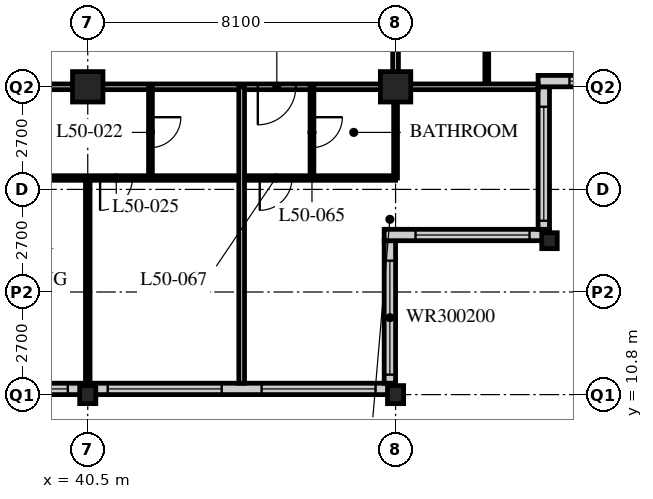
"""IFC4 building model, lengths in metres.
Left out: names, types, materials, properties, quantities, classifications, styles, units other than length and angle.
Written with IfcOpenShell. Run it as: python <this file> out.ifc"""

import sys

from ifc_helpers import new_model, si_unit, direction, frame, frame_2d, origin, origin_2d, place, context, subcontext, project, spatial, rectangle, hollow_rectangle, i_section, extrude, element, fill, save


model = new_model("IFC4")
c1 = context("Model", 3, precision=1e-05, world=origin(), true_north=direction((0.0, 1.0)))
c2 = subcontext(c1, "Body", "Model", "MODEL_VIEW")
j1 = project(units=[si_unit("LENGTHUNIT", "METRE"), si_unit("PLANEANGLEUNIT", "RADIAN")], contexts=[c1])
p1 = place(None, origin())
s1 = spatial("IfcSite", under=j1, at=p1, CompositionType="ELEMENT")
p2 = place(p1, origin())
s2 = spatial("IfcBuilding", under=s1, at=p2, CompositionType="ELEMENT")
p3 = place(p2, frame((0.0, 0.0, 195.6)))
s3 = spatial("IfcBuildingStorey", under=s2, at=p3, CompositionType="ELEMENT", Elevation=195.6)
p4 = place(p3, frame((40.5, 10.8, 0.0), z_axis=(0.0, 0.0, 1.0), x_axis=(1.0, 0.0, 0.0)))
e1 = element("IfcColumn", 1, at=p4, inside=s3, PredefinedType="COLUMN", context=c2, shape_type="SweptSolid", body=[
    extrude(i_section(OverallWidth=0.424, OverallDepth=0.475, WebThickness=0.048, FlangeThickness=0.077, FilletRadius=0.015, at=origin_2d()), origin(), (0.0, 0.0, 1.0), 3.6),
])
p5 = place(p3, frame((40.5, 18.9, 0.0), z_axis=(0.0, 0.0, 1.0), x_axis=(1.0, 0.0, 0.0)))
e2 = element("IfcColumn", 2, at=p5, inside=s3, PredefinedType="COLUMN", context=c2, shape_type="SweptSolid", body=[
    extrude(hollow_rectangle(XDim=0.8, YDim=0.8, WallThickness=0.08, at=origin_2d()), origin(), (0.0, 0.0, 1.0), 3.6),
])
p6 = place(p3, frame((48.6, 10.8, 0.0), z_axis=(0.0, 0.0, 1.0), x_axis=(1.0, 0.0, 0.0)))
e3 = element("IfcColumn", 3, at=p6, inside=s3, PredefinedType="COLUMN", context=c2, shape_type="SweptSolid", body=[
    extrude(i_section(OverallWidth=0.424, OverallDepth=0.475, WebThickness=0.048, FlangeThickness=0.077, FilletRadius=0.015, at=origin_2d()), origin(), (0.0, 0.0, 1.0), 3.6),
])
p7 = place(p3, frame((48.6, 18.9, 0.0), z_axis=(0.0, 0.0, 1.0), x_axis=(1.0, 0.0, 0.0)))
e4 = element("IfcColumn", 4, at=p7, inside=s3, PredefinedType="COLUMN", context=c2, shape_type="SweptSolid", body=[
    extrude(hollow_rectangle(XDim=0.8, YDim=0.8, WallThickness=0.08, at=origin_2d()), origin(), (0.0, 0.0, 1.0), 3.6),
])
p8 = place(p3, frame((52.65, 14.85, 0.0), z_axis=(0.0, 0.0, 1.0), x_axis=(1.0, 0.0, 0.0)))
e5 = element("IfcColumn", 5, at=p8, inside=s3, PredefinedType="COLUMN", context=c2, shape_type="SweptSolid", body=[
    extrude(i_section(OverallWidth=0.407, OverallDepth=0.419, WebThickness=0.031, FlangeThickness=0.049, FilletRadius=0.015, at=origin_2d()), origin(), (0.0, 0.0, 1.0), 3.6),
])
p9 = place(p3, frame((8.4, 10.95, 0.0), z_axis=(0.0, 0.0, 1.0), x_axis=(1.0, 0.0, 0.0)))
e6 = element("IfcWall", 6, at=p9, inside=s3, PredefinedType="SOLIDWALL", context=c2, shape_type="SweptSolid", body=[
    extrude(rectangle(XDim=40.2, YDim=0.3, at=frame_2d((20.1, 0.0))), origin(), (0.0, 0.0, 1.0), 3.39),
])
p10 = place(p9, frame((0.225, 0.0, 0.6)))
e7 = element("IfcOpeningElement", 7, at=p10, cuts=e6, PredefinedType="OPENING", context=c2, shape_type="SweptSolid", body=[
    extrude(rectangle(XDim=3.0, YDim=2.4, at=frame_2d((1.5, 1.2))), frame((0.0, 0.16, 0.0), z_axis=(0.0, -1.0, 0.0), x_axis=(1.0, 0.0, 0.0)), (0.0, 0.0, 1.0), 0.32),
])
p11 = place(p9, frame((4.275, 0.0, 0.6)))
e8 = element("IfcOpeningElement", 8, at=p11, cuts=e6, PredefinedType="OPENING", context=c2, shape_type="SweptSolid", body=[
    extrude(rectangle(XDim=3.0, YDim=2.4, at=frame_2d((1.5, 1.2))), frame((0.0, 0.16, 0.0), z_axis=(0.0, -1.0, 0.0), x_axis=(1.0, 0.0, 0.0)), (0.0, 0.0, 1.0), 0.32),
])
p12 = place(p9, frame((8.325, 0.0, 0.6)))
e9 = element("IfcOpeningElement", 9, at=p12, cuts=e6, PredefinedType="OPENING", context=c2, shape_type="SweptSolid", body=[
    extrude(rectangle(XDim=3.0, YDim=2.4, at=frame_2d((1.5, 1.2))), frame((0.0, 0.16, 0.0), z_axis=(0.0, -1.0, 0.0), x_axis=(1.0, 0.0, 0.0)), (0.0, 0.0, 1.0), 0.32),
])
p13 = place(p9, frame((12.375, 0.0, 0.6)))
e10 = element("IfcOpeningElement", 10, at=p13, cuts=e6, PredefinedType="OPENING", context=c2, shape_type="SweptSolid", body=[
    extrude(rectangle(XDim=3.0, YDim=2.4, at=frame_2d((1.5, 1.2))), frame((0.0, 0.16, 0.0), z_axis=(0.0, -1.0, 0.0), x_axis=(1.0, 0.0, 0.0)), (0.0, 0.0, 1.0), 0.32),
])
p14 = place(p9, frame((16.425, 0.0, 0.6)))
e11 = element("IfcOpeningElement", 11, at=p14, cuts=e6, PredefinedType="OPENING", context=c2, shape_type="SweptSolid", body=[
    extrude(rectangle(XDim=3.0, YDim=2.4, at=frame_2d((1.5, 1.2))), frame((0.0, 0.16, 0.0), z_axis=(0.0, -1.0, 0.0), x_axis=(1.0, 0.0, 0.0)), (0.0, 0.0, 1.0), 0.32),
])
p15 = place(p9, frame((20.475, 0.0, 0.6)))
e12 = element("IfcOpeningElement", 12, at=p15, cuts=e6, PredefinedType="OPENING", context=c2, shape_type="SweptSolid", body=[
    extrude(rectangle(XDim=3.0, YDim=2.4, at=frame_2d((1.5, 1.2))), frame((0.0, 0.16, 0.0), z_axis=(0.0, -1.0, 0.0), x_axis=(1.0, 0.0, 0.0)), (0.0, 0.0, 1.0), 0.32),
])
p16 = place(p9, frame((24.525, 0.0, 0.6)))
e13 = element("IfcOpeningElement", 13, at=p16, cuts=e6, PredefinedType="OPENING", context=c2, shape_type="SweptSolid", body=[
    extrude(rectangle(XDim=3.0, YDim=2.4, at=frame_2d((1.5, 1.2))), frame((0.0, 0.16, 0.0), z_axis=(0.0, -1.0, 0.0), x_axis=(1.0, 0.0, 0.0)), (0.0, 0.0, 1.0), 0.32),
])
p17 = place(p9, frame((28.575, 0.0, 0.6)))
e14 = element("IfcOpeningElement", 14, at=p17, cuts=e6, PredefinedType="OPENING", context=c2, shape_type="SweptSolid", body=[
    extrude(rectangle(XDim=3.0, YDim=2.4, at=frame_2d((1.5, 1.2))), frame((0.0, 0.16, 0.0), z_axis=(0.0, -1.0, 0.0), x_axis=(1.0, 0.0, 0.0)), (0.0, 0.0, 1.0), 0.32),
])
p18 = place(p9, frame((32.625, 0.0, 0.6)))
e15 = element("IfcOpeningElement", 15, at=p18, cuts=e6, PredefinedType="OPENING", context=c2, shape_type="SweptSolid", body=[
    extrude(rectangle(XDim=3.0, YDim=2.4, at=frame_2d((1.5, 1.2))), frame((0.0, 0.16, 0.0), z_axis=(0.0, -1.0, 0.0), x_axis=(1.0, 0.0, 0.0)), (0.0, 0.0, 1.0), 0.32),
])
p19 = place(p9, frame((36.675, 0.0, 0.6)))
e16 = element("IfcOpeningElement", 16, at=p19, cuts=e6, PredefinedType="OPENING", context=c2, shape_type="SweptSolid", body=[
    extrude(rectangle(XDim=3.0, YDim=2.4, at=frame_2d((1.5, 1.2))), frame((0.0, 0.16, 0.0), z_axis=(0.0, -1.0, 0.0), x_axis=(1.0, 0.0, 0.0)), (0.0, 0.0, 1.0), 0.32),
])
p20 = place(p3, frame((48.45, 11.1, 0.0), z_axis=(0.0, 0.0, 1.0), x_axis=(0.0, 1.0, 0.0)))
e17 = element("IfcWall", 17, at=p20, inside=s3, PredefinedType="SOLIDWALL", context=c2, shape_type="SweptSolid", body=[
    extrude(rectangle(XDim=3.75, YDim=0.3, at=frame_2d((1.875, 0.0))), origin(), (0.0, 0.0, 1.0), 3.39),
])
p21 = place(p20, frame((0.225, 0.0, 0.6)))
e18 = element("IfcOpeningElement", 18, at=p21, cuts=e17, PredefinedType="OPENING", context=c2, shape_type="SweptSolid", body=[
    extrude(rectangle(XDim=3.0, YDim=2.0, at=frame_2d((1.5, 1.0))), frame((0.0, 0.16, 0.0), z_axis=(0.0, -1.0, 0.0), x_axis=(1.0, 0.0, 0.0)), (0.0, 0.0, 1.0), 0.32),
])
p22 = place(p3, frame((48.3, 15.0, 0.0), z_axis=(0.0, 0.0, 1.0), x_axis=(1.0, 0.0, 0.0)))
e19 = element("IfcWall", 19, at=p22, inside=s3, PredefinedType="SOLIDWALL", context=c2, shape_type="SweptSolid", body=[
    extrude(rectangle(XDim=4.35, YDim=0.3, at=frame_2d((2.175, 0.0))), origin(), (0.0, 0.0, 1.0), 3.39),
])
p23 = place(p22, frame((0.825, 0.0, 0.6)))
e20 = element("IfcOpeningElement", 20, at=p23, cuts=e19, PredefinedType="OPENING", context=c2, shape_type="SweptSolid", body=[
    extrude(rectangle(XDim=3.0, YDim=2.0, at=frame_2d((1.5, 1.0))), frame((0.0, 0.16, 0.0), z_axis=(0.0, -1.0, 0.0), x_axis=(1.0, 0.0, 0.0)), (0.0, 0.0, 1.0), 0.32),
])
p24 = place(p3, frame((52.5, 15.15, 0.0), z_axis=(0.0, 0.0, 1.0), x_axis=(0.0, 1.0, 0.0)))
e21 = element("IfcWall", 21, at=p24, inside=s3, PredefinedType="SOLIDWALL", context=c2, shape_type="SweptSolid", body=[
    extrude(rectangle(XDim=3.75, YDim=0.3, at=frame_2d((1.875, 0.0))), origin(), (0.0, 0.0, 1.0), 3.39),
])
p25 = place(p24, frame((0.225, 0.0, 0.6)))
e22 = element("IfcOpeningElement", 22, at=p25, cuts=e21, PredefinedType="OPENING", context=c2, shape_type="SweptSolid", body=[
    extrude(rectangle(XDim=3.0, YDim=2.0, at=frame_2d((1.5, 1.0))), frame((0.0, 0.16, 0.0), z_axis=(0.0, -1.0, 0.0), x_axis=(1.0, 0.0, 0.0)), (0.0, 0.0, 1.0), 0.32),
])
p26 = place(p3, frame((52.35, 19.05, 0.0), z_axis=(0.0, 0.0, 1.0), x_axis=(1.0, 0.0, 0.0)))
e23 = element("IfcWall", 23, at=p26, inside=s3, PredefinedType="SOLIDWALL", context=c2, shape_type="SweptSolid", body=[
    extrude(rectangle(XDim=4.35, YDim=0.3, at=frame_2d((2.175, 0.0))), origin(), (0.0, 0.0, 1.0), 3.39),
])
p27 = place(p26, frame((0.825, 0.0, 0.6)))
e24 = element("IfcOpeningElement", 24, at=p27, cuts=e23, PredefinedType="OPENING", context=c2, shape_type="SweptSolid", body=[
    extrude(rectangle(XDim=3.0, YDim=2.0, at=frame_2d((1.5, 1.0))), frame((0.0, 0.16, 0.0), z_axis=(0.0, -1.0, 0.0), x_axis=(1.0, 0.0, 0.0)), (0.0, 0.0, 1.0), 0.32),
])
p28 = place(p3, frame((8.1, 18.9, 0.0), z_axis=(0.0, 0.0, 1.0), x_axis=(1.0, 0.0, 0.0)))
e25 = element("IfcWall", 25, at=p28, inside=s3, PredefinedType="PARTITIONING", context=c2, shape_type="SweptSolid", body=[
    extrude(rectangle(XDim=40.5, YDim=0.15, at=frame_2d((20.25, 0.0))), origin(), (0.0, 0.0, 1.0), 2.778),
])
p29 = place(p28, frame((4.45, 0.0, 0.0)))
e26 = element("IfcOpeningElement", 26, at=p29, cuts=e25, PredefinedType="OPENING", context=c2, shape_type="SweptSolid", body=[
    extrude(rectangle(XDim=1.0, YDim=2.1, at=frame_2d((0.5, 1.05))), frame((0.0, 0.085, 0.0), z_axis=(0.0, -1.0, 0.0), x_axis=(1.0, 0.0, 0.0)), (0.0, 0.0, 1.0), 0.17),
])
p30 = place(p28, frame((17.1, 0.0, 0.0)))
e27 = element("IfcOpeningElement", 27, at=p30, cuts=e25, PredefinedType="OPENING", context=c2, shape_type="SweptSolid", body=[
    extrude(rectangle(XDim=1.0, YDim=2.1, at=frame_2d((0.5, 1.05))), frame((0.0, 0.085, 0.0), z_axis=(0.0, -1.0, 0.0), x_axis=(1.0, 0.0, 0.0)), (0.0, 0.0, 1.0), 0.17),
])
p31 = place(p28, frame((28.75, 0.0, 0.0)))
e28 = element("IfcOpeningElement", 28, at=p31, cuts=e25, PredefinedType="OPENING", context=c2, shape_type="SweptSolid", body=[
    extrude(rectangle(XDim=1.0, YDim=2.1, at=frame_2d((0.5, 1.05))), frame((0.0, 0.085, 0.0), z_axis=(0.0, -1.0, 0.0), x_axis=(1.0, 0.0, 0.0)), (0.0, 0.0, 1.0), 0.17),
])
p32 = place(p28, frame((2.625, 0.0, 0.0)))
e29 = element("IfcOpeningElement", 29, at=p32, cuts=e25, PredefinedType="OPENING", context=c2, shape_type="SweptSolid", body=[
    extrude(rectangle(XDim=1.0, YDim=2.1, at=frame_2d((0.5, 1.05))), frame((0.0, 0.085, 0.0), z_axis=(0.0, -1.0, 0.0), x_axis=(1.0, 0.0, 0.0)), (0.0, 0.0, 1.0), 0.17),
])
p33 = place(p28, frame((36.875, 0.0, 0.0)))
e30 = element("IfcOpeningElement", 30, at=p33, cuts=e25, PredefinedType="OPENING", context=c2, shape_type="SweptSolid", body=[
    extrude(rectangle(XDim=1.0, YDim=2.1, at=frame_2d((0.5, 1.05))), frame((0.0, 0.085, 0.0), z_axis=(0.0, -1.0, 0.0), x_axis=(1.0, 0.0, 0.0)), (0.0, 0.0, 1.0), 0.17),
])
p34 = place(p3, frame((48.6, 18.9, 0.0), z_axis=(0.0, 0.0, 1.0), x_axis=(0.0, 1.0, 0.0)))
e31 = element("IfcWall", 31, at=p34, inside=s3, PredefinedType="PARTITIONING", context=c2, shape_type="SweptSolid", body=[
    extrude(rectangle(XDim=24.3, YDim=0.15, at=frame_2d((12.15, 0.0))), origin(), (0.0, 0.0, 1.0), 2.778),
])
p35 = place(p34, frame((2.35, 0.0, 0.0)))
e32 = element("IfcOpeningElement", 32, at=p35, cuts=e31, PredefinedType="OPENING", context=c2, shape_type="SweptSolid", body=[
    extrude(rectangle(XDim=1.0, YDim=2.1, at=frame_2d((0.5, 1.05))), frame((0.0, 0.085, 0.0), z_axis=(0.0, -1.0, 0.0), x_axis=(1.0, 0.0, 0.0)), (0.0, 0.0, 1.0), 0.17),
])
p36 = place(p34, frame((4.75, 0.0, 0.0)))
e33 = element("IfcOpeningElement", 33, at=p36, cuts=e31, PredefinedType="OPENING", context=c2, shape_type="SweptSolid", body=[
    extrude(rectangle(XDim=1.0, YDim=2.1, at=frame_2d((0.5, 1.05))), frame((0.0, 0.085, 0.0), z_axis=(0.0, -1.0, 0.0), x_axis=(1.0, 0.0, 0.0)), (0.0, 0.0, 1.0), 0.17),
])
p37 = place(p34, frame((9.0, 0.0, 0.0)))
e34 = element("IfcOpeningElement", 34, at=p37, cuts=e31, PredefinedType="OPENING", context=c2, shape_type="SweptSolid", body=[
    extrude(rectangle(XDim=1.0, YDim=2.1, at=frame_2d((0.5, 1.05))), frame((0.0, 0.085, 0.0), z_axis=(0.0, -1.0, 0.0), x_axis=(1.0, 0.0, 0.0)), (0.0, 0.0, 1.0), 0.17),
])
p38 = place(p3, frame((42.15, 18.9, 0.0), z_axis=(0.0, 0.0, 1.0), x_axis=(0.0, -1.0, 0.0)))
e35 = element("IfcWall", 35, at=p38, inside=s3, PredefinedType="PARTITIONING", context=c2, shape_type="SweptSolid", body=[
    extrude(rectangle(XDim=2.4, YDim=0.1, at=frame_2d((1.2, 0.0))), origin(), (0.0, 0.0, 1.0), 3.39),
])
p39 = place(p38, frame((0.8, 0.0, 0.0)))
e36 = element("IfcOpeningElement", 36, at=p39, cuts=e35, PredefinedType="OPENING", context=c2, shape_type="SweptSolid", body=[
    extrude(rectangle(XDim=0.8, YDim=2.1, at=frame_2d((0.4, 1.05))), frame((0.0, 0.06, 0.0), z_axis=(0.0, -1.0, 0.0), x_axis=(1.0, 0.0, 0.0)), (0.0, 0.0, 1.0), 0.12),
])
p40 = place(p3, frame((40.5, 16.5, 0.0), z_axis=(0.0, 0.0, 1.0), x_axis=(0.0, -1.0, 0.0)))
e37 = element("IfcWall", 37, at=p40, inside=s3, PredefinedType="PARTITIONING", context=c2, shape_type="SweptSolid", body=[
    extrude(rectangle(XDim=5.4, YDim=0.12, at=frame_2d((2.7, 0.0))), origin(), (0.0, 0.0, 1.0), 2.778),
])
p41 = place(p3, frame((51.0, 18.9, 0.0), z_axis=(0.0, 0.0, 1.0), x_axis=(0.0, 1.0, 0.0)))
e38 = element("IfcWall", 38, at=p41, inside=s3, PredefinedType="PARTITIONING", context=c2, shape_type="SweptSolid", body=[
    extrude(rectangle(XDim=2.2, YDim=0.1, at=frame_2d((1.1, 0.0))), origin(), (0.0, 0.0, 1.0), 3.39),
])
p42 = place(p3, frame((8.1, 16.5, 0.0), z_axis=(0.0, 0.0, 1.0), x_axis=(1.0, 0.0, 0.0)))
e39 = element("IfcWall", 39, at=p42, inside=s3, PredefinedType="PARTITIONING", context=c2, shape_type="SweptSolid", body=[
    extrude(rectangle(XDim=40.5, YDim=0.12, at=frame_2d((20.25, 0.0))), origin(), (0.0, 0.0, 1.0), 3.39),
])
p43 = place(p42, frame((5.025, 0.0, 0.0)))
e40 = element("IfcOpeningElement", 40, at=p43, cuts=e39, PredefinedType="OPENING", context=c2, shape_type="SweptSolid", body=[
    extrude(rectangle(XDim=0.85, YDim=2.1, at=frame_2d((0.425, 1.05))), frame((0.0, 0.07, 0.0), z_axis=(0.0, -1.0, 0.0), x_axis=(1.0, 0.0, 0.0)), (0.0, 0.0, 1.0), 0.14),
])
p44 = place(p42, frame((12.475, 0.0, 0.0)))
e41 = element("IfcOpeningElement", 41, at=p44, cuts=e39, PredefinedType="OPENING", context=c2, shape_type="SweptSolid", body=[
    extrude(rectangle(XDim=0.85, YDim=2.1, at=frame_2d((0.425, 1.05))), frame((0.0, 0.07, 0.0), z_axis=(0.0, -1.0, 0.0), x_axis=(1.0, 0.0, 0.0)), (0.0, 0.0, 1.0), 0.14),
])
p45 = place(p42, frame((17.175, 0.0, 0.0)))
e42 = element("IfcOpeningElement", 42, at=p45, cuts=e39, PredefinedType="OPENING", context=c2, shape_type="SweptSolid", body=[
    extrude(rectangle(XDim=0.85, YDim=2.1, at=frame_2d((0.425, 1.05))), frame((0.0, 0.07, 0.0), z_axis=(0.0, -1.0, 0.0), x_axis=(1.0, 0.0, 0.0)), (0.0, 0.0, 1.0), 0.14),
])
p46 = place(p42, frame((24.625, 0.0, 0.0)))
e43 = element("IfcOpeningElement", 43, at=p46, cuts=e39, PredefinedType="OPENING", context=c2, shape_type="SweptSolid", body=[
    extrude(rectangle(XDim=0.85, YDim=2.1, at=frame_2d((0.425, 1.05))), frame((0.0, 0.07, 0.0), z_axis=(0.0, -1.0, 0.0), x_axis=(1.0, 0.0, 0.0)), (0.0, 0.0, 1.0), 0.14),
])
p47 = place(p42, frame((29.325, 0.0, 0.0)))
e44 = element("IfcOpeningElement", 44, at=p47, cuts=e39, PredefinedType="OPENING", context=c2, shape_type="SweptSolid", body=[
    extrude(rectangle(XDim=0.85, YDim=2.1, at=frame_2d((0.425, 1.05))), frame((0.0, 0.07, 0.0), z_axis=(0.0, -1.0, 0.0), x_axis=(1.0, 0.0, 0.0)), (0.0, 0.0, 1.0), 0.14),
])
p48 = place(p42, frame((32.725, 0.0, 0.0)))
e45 = element("IfcOpeningElement", 45, at=p48, cuts=e39, PredefinedType="OPENING", context=c2, shape_type="SweptSolid", body=[
    extrude(rectangle(XDim=0.85, YDim=2.1, at=frame_2d((0.425, 1.05))), frame((0.0, 0.07, 0.0), z_axis=(0.0, -1.0, 0.0), x_axis=(1.0, 0.0, 0.0)), (0.0, 0.0, 1.0), 0.14),
])
p49 = place(p42, frame((2.725, 0.0, 0.0)))
e46 = element("IfcOpeningElement", 46, at=p49, cuts=e39, PredefinedType="OPENING", context=c2, shape_type="SweptSolid", body=[
    extrude(rectangle(XDim=0.85, YDim=2.1, at=frame_2d((0.425, 1.05))), frame((0.0, 0.07, 0.0), z_axis=(0.0, -1.0, 0.0), x_axis=(1.0, 0.0, 0.0)), (0.0, 0.0, 1.0), 0.14),
])
p50 = place(p42, frame((36.925, 0.0, 0.0)))
e47 = element("IfcOpeningElement", 47, at=p50, cuts=e39, PredefinedType="OPENING", context=c2, shape_type="SweptSolid", body=[
    extrude(rectangle(XDim=0.85, YDim=2.1, at=frame_2d((0.425, 1.05))), frame((0.0, 0.07, 0.0), z_axis=(0.0, -1.0, 0.0), x_axis=(1.0, 0.0, 0.0)), (0.0, 0.0, 1.0), 0.14),
])
p51 = place(p3, frame((46.4, 18.9, 0.0), z_axis=(0.0, 0.0, 1.0), x_axis=(0.0, -1.0, 0.0)))
e48 = element("IfcWall", 48, at=p51, inside=s3, PredefinedType="PARTITIONING", context=c2, shape_type="SweptSolid", body=[
    extrude(rectangle(XDim=2.4, YDim=0.1, at=frame_2d((1.2, 0.0))), origin(), (0.0, 0.0, 1.0), 3.39),
])
p52 = place(p51, frame((0.8, 0.0, 0.0)))
e49 = element("IfcOpeningElement", 49, at=p52, cuts=e48, PredefinedType="OPENING", context=c2, shape_type="SweptSolid", body=[
    extrude(rectangle(XDim=0.8, YDim=2.1, at=frame_2d((0.4, 1.05))), frame((0.0, 0.06, 0.0), z_axis=(0.0, -1.0, 0.0), x_axis=(1.0, 0.0, 0.0)), (0.0, 0.0, 1.0), 0.12),
])
p53 = place(p3, frame((48.6, 18.9, 0.0), z_axis=(0.0, 0.0, 1.0), x_axis=(0.0, -1.0, 0.0)))
e50 = element("IfcWall", 50, at=p53, inside=s3, PredefinedType="PARTITIONING", context=c2, shape_type="SweptSolid", body=[
    extrude(rectangle(XDim=2.4, YDim=0.1, at=frame_2d((1.2, 0.0))), origin(), (0.0, 0.0, 1.0), 2.778),
])
p54 = place(p3, frame((48.6, 18.9, 0.0), z_axis=(0.0, 0.0, 1.0), x_axis=(1.0, 0.0, 0.0)))
e51 = element("IfcWall", 51, at=p54, inside=s3, PredefinedType="PARTITIONING", context=c2, shape_type="SweptSolid", body=[
    extrude(rectangle(XDim=3.75, YDim=0.15, at=frame_2d((1.875, 0.0))), origin(), (0.0, 0.0, 1.0), 2.778),
])
p55 = place(p3, frame((44.55, 18.9, 0.0), z_axis=(0.0, 0.0, 1.0), x_axis=(0.0, -1.0, 0.0)))
e52 = element("IfcWall", 52, at=p55, inside=s3, PredefinedType="PARTITIONING", context=c2, shape_type="SweptSolid", body=[
    extrude(rectangle(XDim=7.8, YDim=0.15, at=frame_2d((3.9, 0.0))), origin(), (0.0, 0.0, 1.0), 3.39),
])
p56 = place(p17, origin())
e53 = element("IfcWindow", 53, at=p56, inside=s3, PartitioningType="SINGLE_PANEL", PredefinedType="WINDOW", context=c2, shape_type="SweptSolid", body=[
    extrude(rectangle(XDim=3.0, YDim=2.4, at=frame_2d((1.5, 1.2))), frame((0.0, 0.03, 0.0), z_axis=(0.0, -1.0, 0.0), x_axis=(1.0, 0.0, 0.0)), (0.0, 0.0, 1.0), 0.06),
])
fill(e14, e53)
p57 = place(p18, origin())
e54 = element("IfcWindow", 54, at=p57, inside=s3, PartitioningType="SINGLE_PANEL", PredefinedType="WINDOW", context=c2, shape_type="SweptSolid", body=[
    extrude(rectangle(XDim=3.0, YDim=2.4, at=frame_2d((1.5, 1.2))), frame((0.0, 0.03, 0.0), z_axis=(0.0, -1.0, 0.0), x_axis=(1.0, 0.0, 0.0)), (0.0, 0.0, 1.0), 0.06),
])
fill(e15, e54)
p58 = place(p19, origin())
e55 = element("IfcWindow", 55, at=p58, inside=s3, PartitioningType="SINGLE_PANEL", PredefinedType="WINDOW", context=c2, shape_type="SweptSolid", body=[
    extrude(rectangle(XDim=3.0, YDim=2.4, at=frame_2d((1.5, 1.2))), frame((0.0, 0.03, 0.0), z_axis=(0.0, -1.0, 0.0), x_axis=(1.0, 0.0, 0.0)), (0.0, 0.0, 1.0), 0.06),
])
fill(e16, e55)
p59 = place(p21, origin())
e56 = element("IfcWindow", 56, at=p59, inside=s3, PartitioningType="SINGLE_PANEL", PredefinedType="WINDOW", context=c2, shape_type="SweptSolid", body=[
    extrude(rectangle(XDim=3.0, YDim=2.0, at=frame_2d((1.5, 1.0))), frame((0.0, 0.03, 0.0), z_axis=(0.0, -1.0, 0.0), x_axis=(1.0, 0.0, 0.0)), (0.0, 0.0, 1.0), 0.06),
])
fill(e18, e56)
p60 = place(p23, origin())
e57 = element("IfcWindow", 57, at=p60, inside=s3, PartitioningType="SINGLE_PANEL", PredefinedType="WINDOW", context=c2, shape_type="SweptSolid", body=[
    extrude(rectangle(XDim=3.0, YDim=2.0, at=frame_2d((1.5, 1.0))), frame((0.0, 0.03, 0.0), z_axis=(0.0, -1.0, 0.0), x_axis=(1.0, 0.0, 0.0)), (0.0, 0.0, 1.0), 0.06),
])
fill(e20, e57)
p61 = place(p25, origin())
e58 = element("IfcWindow", 58, at=p61, inside=s3, PartitioningType="SINGLE_PANEL", PredefinedType="WINDOW", context=c2, shape_type="SweptSolid", body=[
    extrude(rectangle(XDim=3.0, YDim=2.0, at=frame_2d((1.5, 1.0))), frame((0.0, 0.03, 0.0), z_axis=(0.0, -1.0, 0.0), x_axis=(1.0, 0.0, 0.0)), (0.0, 0.0, 1.0), 0.06),
])
fill(e22, e58)
p62 = place(p27, origin())
e59 = element("IfcWindow", 59, at=p62, inside=s3, PartitioningType="SINGLE_PANEL", PredefinedType="WINDOW", context=c2, shape_type="SweptSolid", body=[
    extrude(rectangle(XDim=3.0, YDim=2.0, at=frame_2d((1.5, 1.0))), frame((0.0, 0.03, 0.0), z_axis=(0.0, -1.0, 0.0), x_axis=(1.0, 0.0, 0.0)), (0.0, 0.0, 1.0), 0.06),
])
fill(e24, e59)
p63 = place(p39, origin())
e60 = element("IfcDoor", 60, at=p63, inside=s3, OperationType="SINGLE_SWING_LEFT", PredefinedType="DOOR", context=c2, shape_type="SweptSolid", body=[
    extrude(rectangle(XDim=0.8, YDim=2.1, at=frame_2d((0.4, 1.05))), frame((0.0, 0.025, 0.0), z_axis=(0.0, -1.0, 0.0), x_axis=(1.0, 0.0, 0.0)), (0.0, 0.0, 1.0), 0.05),
])
fill(e36, e60)
p64 = place(p48, origin())
e61 = element("IfcDoor", 61, at=p64, inside=s3, OperationType="SINGLE_SWING_RIGHT", PredefinedType="DOOR", context=c2, shape_type="SweptSolid", body=[
    extrude(rectangle(XDim=0.85, YDim=2.1, at=frame_2d((0.425, 1.05))), frame((0.0, 0.025, 0.0), z_axis=(0.0, -1.0, 0.0), x_axis=(1.0, 0.0, 0.0)), (0.0, 0.0, 1.0), 0.05),
])
fill(e45, e61)
p65 = place(p52, origin())
e62 = element("IfcDoor", 62, at=p65, inside=s3, OperationType="SINGLE_SWING_LEFT", PredefinedType="DOOR", context=c2, shape_type="SweptSolid", body=[
    extrude(rectangle(XDim=0.8, YDim=2.1, at=frame_2d((0.4, 1.05))), frame((0.0, 0.025, 0.0), z_axis=(0.0, -1.0, 0.0), x_axis=(1.0, 0.0, 0.0)), (0.0, 0.0, 1.0), 0.05),
])
fill(e49, e62)
p66 = place(p33, origin())
e63 = element("IfcDoor", 63, at=p66, inside=s3, OperationType="SINGLE_SWING_RIGHT", PredefinedType="DOOR", context=c2, shape_type="SweptSolid", body=[
    extrude(rectangle(XDim=1.0, YDim=2.1, at=frame_2d((0.5, 1.05))), frame((0.0, 0.025, 0.0), z_axis=(0.0, -1.0, 0.0), x_axis=(1.0, 0.0, 0.0)), (0.0, 0.0, 1.0), 0.05),
])
fill(e30, e63)
p67 = place(p50, origin())
e64 = element("IfcDoor", 64, at=p67, inside=s3, OperationType="SINGLE_SWING_RIGHT", PredefinedType="DOOR", context=c2, shape_type="SweptSolid", body=[
    extrude(rectangle(XDim=0.85, YDim=2.1, at=frame_2d((0.425, 1.05))), frame((0.0, 0.025, 0.0), z_axis=(0.0, -1.0, 0.0), x_axis=(1.0, 0.0, 0.0)), (0.0, 0.0, 1.0), 0.05),
])
fill(e47, e64)
save(model, sys.argv[1])
